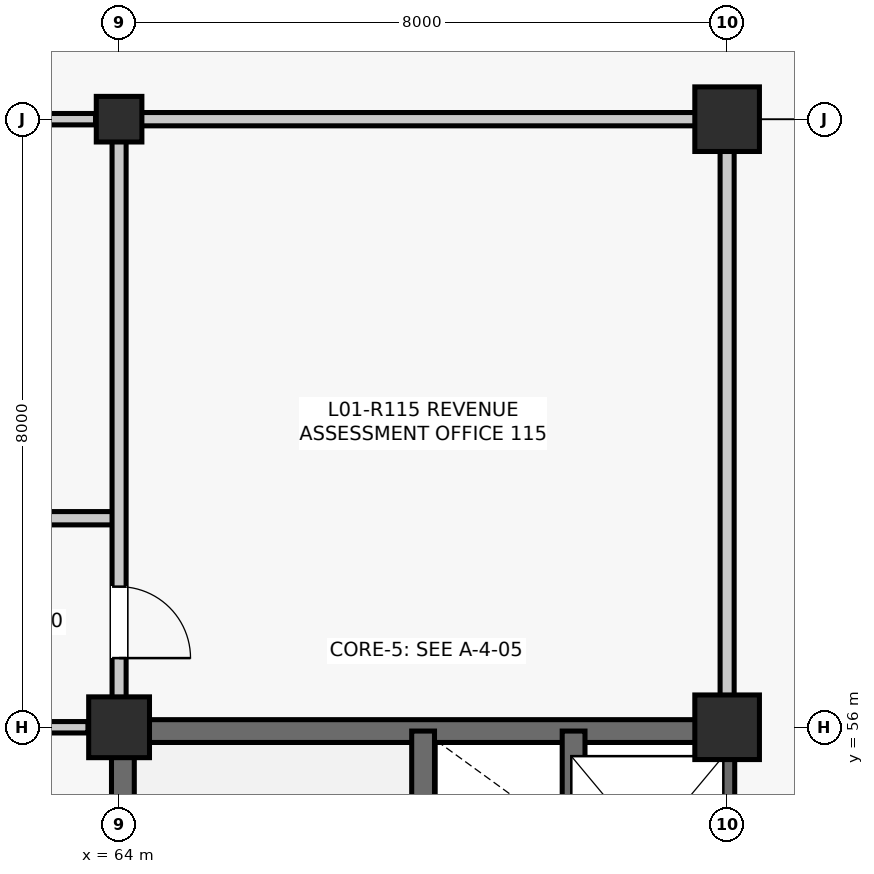
"""IFC4 building model, lengths in metres.
Left out: names, types, materials, properties, quantities, classifications, styles, units other than length and angle.
Written with IfcOpenShell. Run it as: python <this file> out.ifc"""

import sys

from ifc_helpers import new_model, si_unit, direction, frame, frame_2d, origin, origin_2d, place, context, subcontext, project, spatial, rectangle, extrude, element, fill, save


model = new_model("IFC4")
c1 = context("Model", 3, precision=1e-05, world=origin(), true_north=direction((0.0, 1.0)))
c2 = subcontext(c1, "Body", "Model", "MODEL_VIEW")
j1 = project(units=[si_unit("LENGTHUNIT", "METRE"), si_unit("PLANEANGLEUNIT", "RADIAN")], contexts=[c1])
p1 = place(None, origin())
s1 = spatial("IfcSite", under=j1, at=p1, CompositionType="ELEMENT")
p2 = place(p1, origin())
s2 = spatial("IfcBuilding", under=s1, at=p2, CompositionType="ELEMENT")
p3 = place(p2, frame((0.0, 0.0, 5.28)))
s3 = spatial("IfcBuildingStorey", under=s2, at=p3, CompositionType="ELEMENT", Elevation=5.28)
p4 = place(p3, frame((64.0, 56.0, 0.0), z_axis=(0.0, 0.0, 1.0), x_axis=(1.0, 0.0, 0.0)))
e1 = element("IfcColumn", 1, at=p4, inside=s3, PredefinedType="COLUMN", context=c2, shape_type="SweptSolid", body=[
    extrude(rectangle(XDim=0.8, YDim=0.8, at=origin_2d()), origin(), (0.0, 0.0, 1.0), 4.62),
])
p5 = place(p3, frame((64.0, 64.0, 0.0), z_axis=(0.0, 0.0, 1.0), x_axis=(1.0, 0.0, 0.0)))
e2 = element("IfcColumn", 2, at=p5, inside=s3, PredefinedType="COLUMN", context=c2, shape_type="SweptSolid", body=[
    extrude(rectangle(XDim=0.6, YDim=0.6, at=origin_2d()), origin(), (0.0, 0.0, 1.0), 4.62),
])
for number, where, z_axis, x_axis in (
    (3, (72.0, 56.0, 0.0), (0.0, 0.0, 1.0), (1.0, 0.0, 0.0)),
    (4, (72.0, 64.0, 0.0), (0.0, 0.0, 1.0), (1.0, 0.0, 0.0)),
):
    element("IfcColumn", number, at=place(p3, frame(where, z_axis=z_axis, x_axis=x_axis)), inside=s3, PredefinedType="COLUMN", context=c2, shape_type="SweptSolid", body=[
        extrude(rectangle(XDim=0.85, YDim=0.85, at=origin_2d()), origin(), (0.0, 0.0, 1.0), 4.62),
    ])
p6 = place(p3, frame((64.05, 48.29, 0.0), z_axis=(0.0, 0.0, 1.0), x_axis=(0.0, 1.0, 0.0)))
e5 = element("IfcWall", 5, at=p6, inside=s3, PredefinedType="SHEAR", context=c2, shape_type="SweptSolid", body=[
    extrude(rectangle(XDim=7.42, YDim=0.3, at=frame_2d((3.71, 0.0))), origin(), (0.0, 0.0, 1.0), 4.335),
])
p7 = place(p3, frame((64.29, 55.95, 0.0), z_axis=(0.0, 0.0, 1.0), x_axis=(1.0, 0.0, 0.0)))
e6 = element("IfcWall", 6, at=p7, inside=s3, PredefinedType="SHEAR", context=c2, shape_type="SweptSolid", body=[
    extrude(rectangle(XDim=7.395, YDim=0.3, at=frame_2d((3.698, 0.0))), origin(), (0.0, 0.0, 1.0), 4.335),
])
p8 = place(p3, frame((71.95, 48.315, 0.0), z_axis=(0.0, 0.0, 1.0), x_axis=(0.0, 1.0, 0.0)))
e7 = element("IfcWall", 7, at=p8, inside=s3, PredefinedType="SHEAR", context=c2, shape_type="SweptSolid", body=[
    extrude(rectangle(XDim=7.37, YDim=0.3, at=frame_2d((3.685, 0.0))), origin(), (0.0, 0.0, 1.0), 4.335),
])
p9 = place(p3, frame((68.0, 48.05, 0.0), z_axis=(0.0, 0.0, 1.0), x_axis=(0.0, 1.0, 0.0)))
e8 = element("IfcWall", 8, at=p9, inside=s3, PredefinedType="SHEAR", context=c2, shape_type="SweptSolid", body=[
    extrude(rectangle(XDim=7.9, YDim=0.3, at=frame_2d((3.95, 0.0))), origin(), (0.0, 0.0, 1.0), 4.335),
])
p10 = place(p9, frame((0.55, 0.0, 0.0)))
e9 = element("IfcOpeningElement", 9, at=p10, cuts=e8, PredefinedType="OPENING", context=c2, shape_type="SweptSolid", body=[
    extrude(rectangle(XDim=1.1, YDim=2.15, at=frame_2d((0.55, 1.075))), frame((0.0, 0.16, 0.0), z_axis=(0.0, -1.0, 0.0), x_axis=(1.0, 0.0, 0.0)), (0.0, 0.0, 1.0), 0.32),
])
p11 = place(p3, frame((69.98, 53.05, 0.0), z_axis=(0.0, 0.0, 1.0), x_axis=(0.0, 1.0, 0.0)))
e10 = element("IfcWall", 10, at=p11, inside=s3, PredefinedType="SHEAR", context=c2, shape_type="SweptSolid", body=[
    extrude(rectangle(XDim=2.9, YDim=0.3, at=frame_2d((1.45, 0.0))), origin(), (0.0, 0.0, 1.0), 4.335),
])
p12 = place(p3, frame((58.75, 56.0, 0.0), z_axis=(0.0, 0.0, 1.0), x_axis=(1.0, 0.0, 0.0)))
e11 = element("IfcWall", 11, at=p12, inside=s3, PredefinedType="PARTITIONING", context=c2, shape_type="SweptSolid", body=[
    extrude(rectangle(XDim=4.84, YDim=0.15, at=frame_2d((2.42, 0.0))), origin(), (0.0, 0.0, 1.0), 3.771),
])
p13 = place(p3, frame((58.7, 58.75, 0.0), z_axis=(0.0, 0.0, 1.0), x_axis=(1.0, 0.0, 0.0)))
e12 = element("IfcWall", 12, at=p13, inside=s3, PredefinedType="PARTITIONING", context=c2, shape_type="SweptSolid", body=[
    extrude(rectangle(XDim=5.28, YDim=0.175, at=frame_2d((2.64, 0.0))), origin(), (0.0, 0.0, 1.0), 3.851),
])
p14 = place(p13, frame((2.08, 0.0, 0.0)))
e13 = element("IfcOpeningElement", 13, at=p14, cuts=e12, PredefinedType="OPENING", context=c2, shape_type="SweptSolid", body=[
    extrude(rectangle(XDim=1.12, YDim=2.22, at=frame_2d((0.56, 1.11))), frame((0.0, 0.097, 0.0), z_axis=(0.0, -1.0, 0.0), x_axis=(1.0, 0.0, 0.0)), (0.0, 0.0, 1.0), 0.195),
])
p15 = place(p3, frame((58.75, 64.0, 0.0), z_axis=(0.0, 0.0, 1.0), x_axis=(1.0, 0.0, 0.0)))
e14 = element("IfcWall", 14, at=p15, inside=s3, PredefinedType="PARTITIONING", context=c2, shape_type="SweptSolid", body=[
    extrude(rectangle(XDim=4.94, YDim=0.15, at=frame_2d((2.47, 0.0))), origin(), (0.0, 0.0, 1.0), 3.781),
])
p16 = place(p3, frame((64.0, 56.39, 0.0), z_axis=(0.0, 0.0, 1.0), x_axis=(0.0, 1.0, 0.0)))
e15 = element("IfcWall", 15, at=p16, inside=s3, PredefinedType="PARTITIONING", context=c2, shape_type="SweptSolid", body=[
    extrude(rectangle(XDim=7.32, YDim=0.185, at=frame_2d((3.66, 0.0))), origin(), (0.0, 0.0, 1.0), 3.851),
])
p17 = place(p16, frame((0.52, 0.0, 0.0)))
e16 = element("IfcOpeningElement", 16, at=p17, cuts=e15, PredefinedType="OPENING", context=c2, shape_type="SweptSolid", body=[
    extrude(rectangle(XDim=0.94, YDim=2.12, at=frame_2d((0.47, 1.06))), frame((0.0, 0.103, 0.0), z_axis=(0.0, -1.0, 0.0), x_axis=(1.0, 0.0, 0.0)), (0.0, 0.0, 1.0), 0.205),
])
p18 = place(p3, frame((72.0, 56.415, 0.0), z_axis=(0.0, 0.0, 1.0), x_axis=(0.0, 1.0, 0.0)))
e17 = element("IfcWall", 17, at=p18, inside=s3, PredefinedType="PARTITIONING", context=c2, shape_type="SweptSolid", body=[
    extrude(rectangle(XDim=7.17, YDim=0.185, at=frame_2d((3.585, 0.0))), origin(), (0.0, 0.0, 1.0), 3.787),
])
p19 = place(p3, frame((64.29, 64.0, 0.0), z_axis=(0.0, 0.0, 1.0), x_axis=(1.0, 0.0, 0.0)))
e18 = element("IfcWall", 18, at=p19, inside=s3, PredefinedType="PARTITIONING", context=c2, shape_type="SweptSolid", body=[
    extrude(rectangle(XDim=7.295, YDim=0.175, at=frame_2d((3.647, 0.0))), origin(), (0.0, 0.0, 1.0), 3.712),
])
p20 = place(p17, frame((0.94, 0.0, 0.0), z_axis=(0.0, 0.0, 1.0), x_axis=(-1.0, 0.0, 0.0)))
e19 = element("IfcDoor", 19, at=p20, inside=s3, OperationType="SINGLE_SWING_LEFT", PredefinedType="DOOR", context=c2, shape_type="SweptSolid", body=[
    extrude(rectangle(XDim=0.94, YDim=2.12, at=frame_2d((0.47, 1.06))), frame((0.0, 0.025, 0.0), z_axis=(0.0, -1.0, 0.0), x_axis=(1.0, 0.0, 0.0)), (0.0, 0.0, 1.0), 0.05),
])
fill(e16, e19)
save(model, sys.argv[1])
